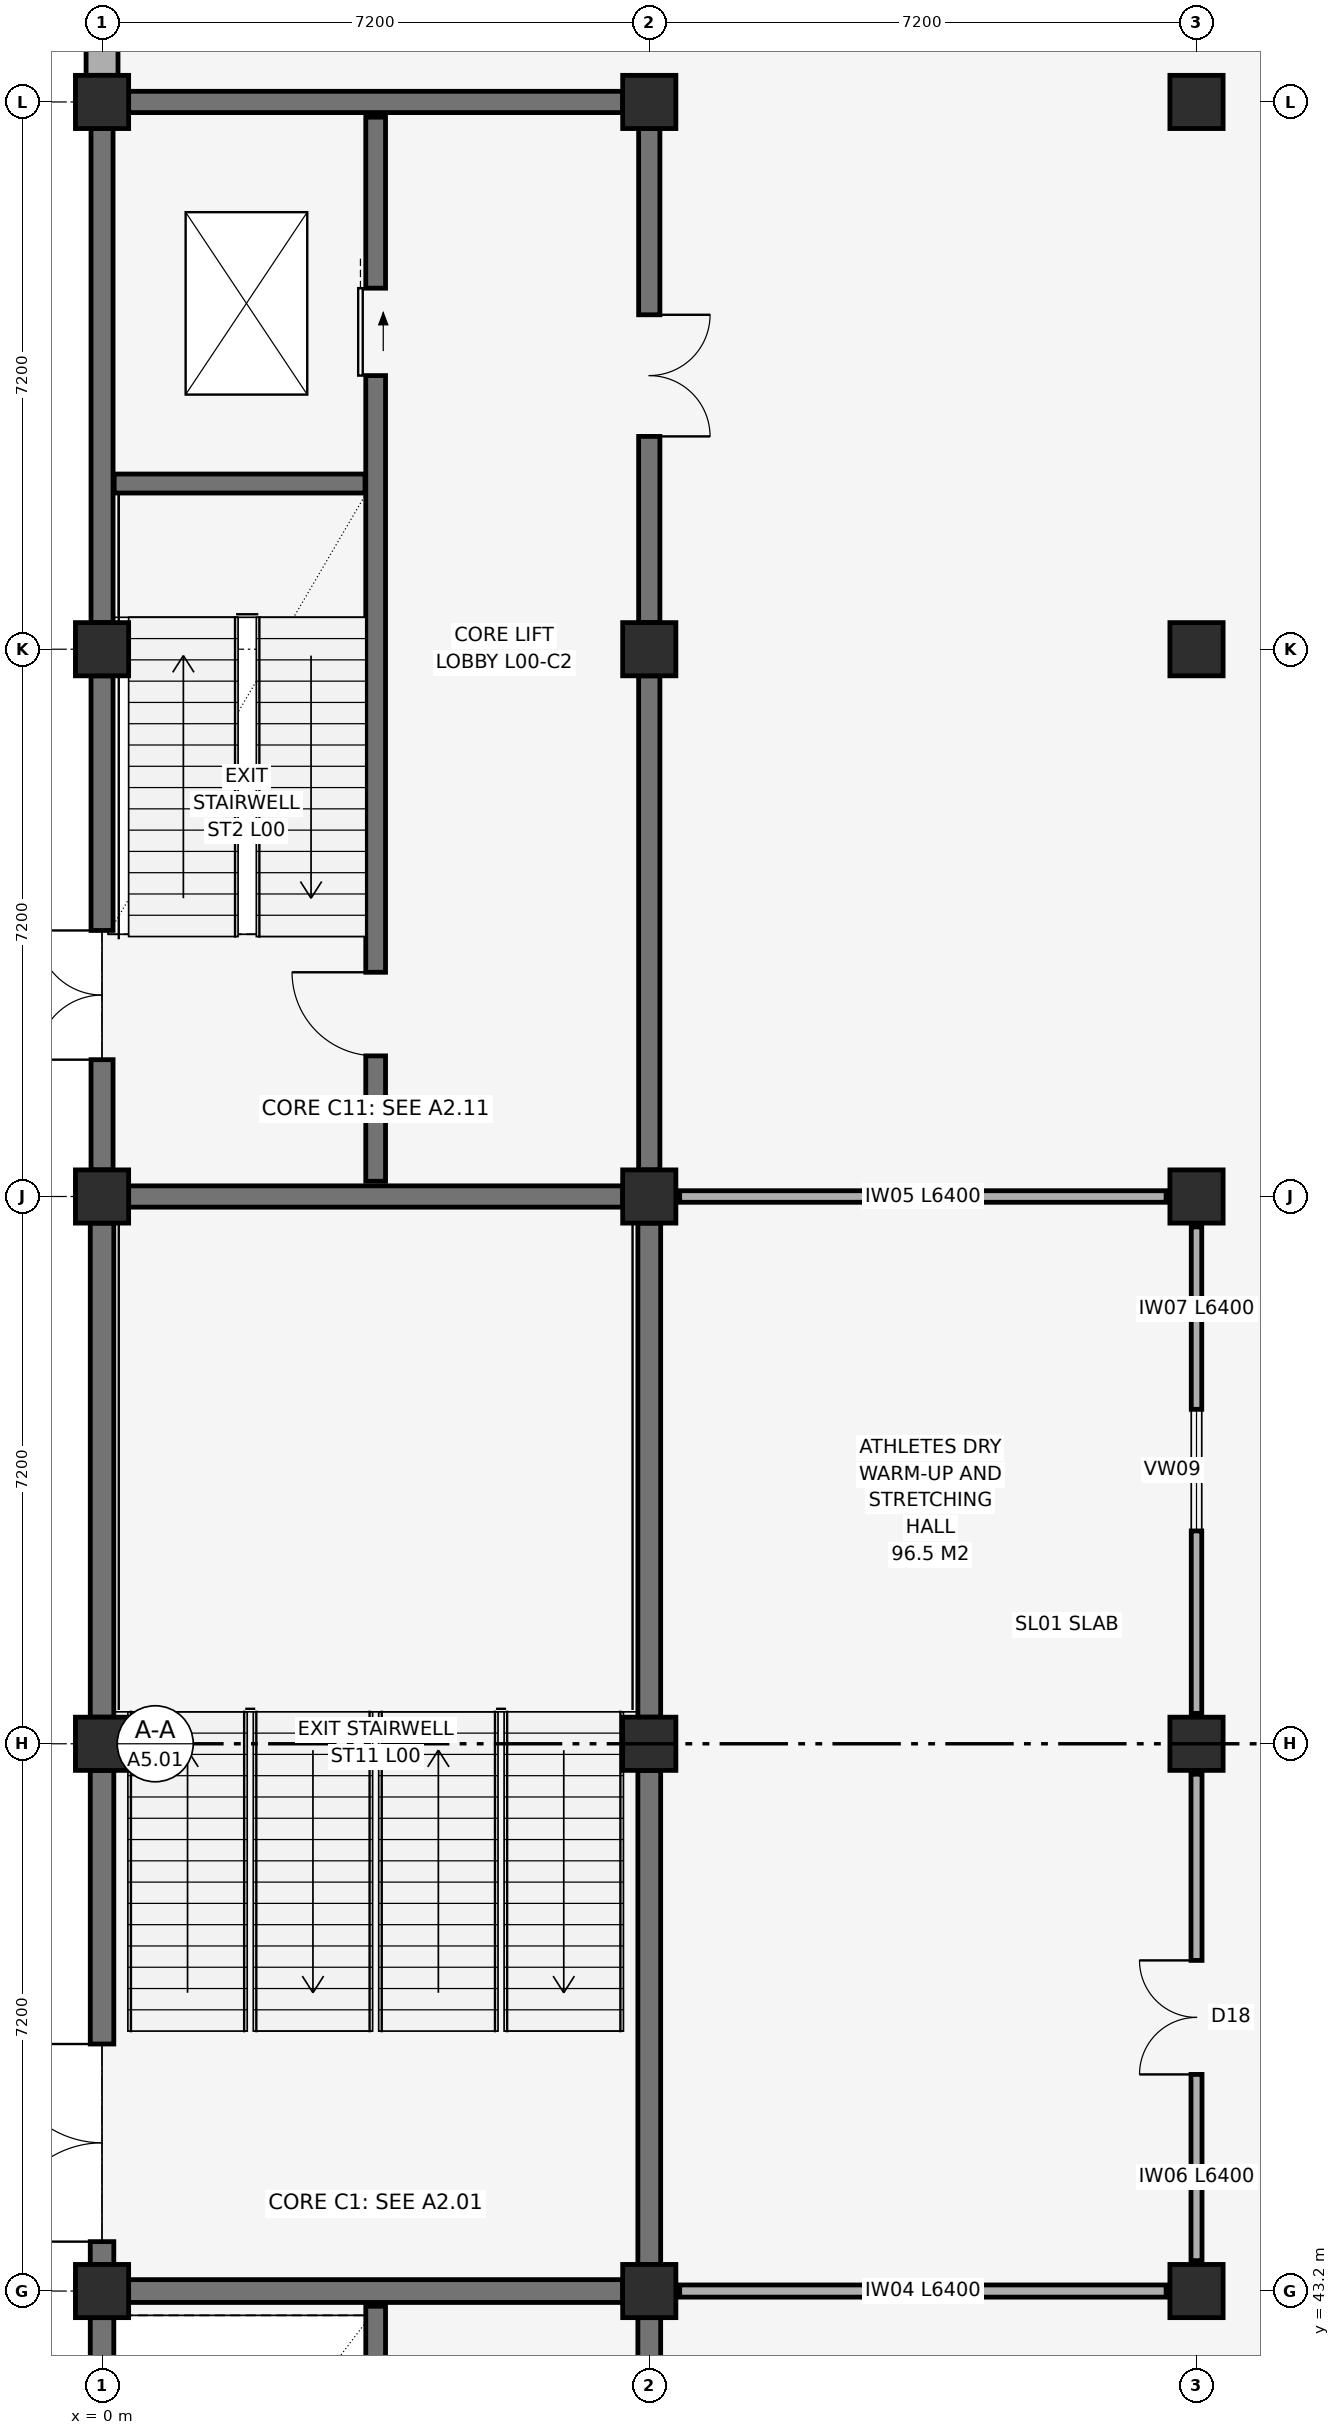
"""IFC4 building model, lengths in metres.
Left out: names, types, materials, properties, quantities, classifications, styles, units other than length and angle.
Written with IfcOpenShell. Run it as: python <this file> out.ifc"""

import sys

from ifc_helpers import new_model, si_unit, direction, frame, frame_2d, origin, origin_2d, place, context, subcontext, project, spatial, rectangle, extrude, element, fill, save


model = new_model("IFC4")
c1 = context("Model", 3, precision=1e-05, world=origin(), true_north=direction((0.0, 1.0)))
c2 = subcontext(c1, "Body", "Model", "MODEL_VIEW")
j1 = project(units=[si_unit("LENGTHUNIT", "METRE"), si_unit("PLANEANGLEUNIT", "RADIAN")], contexts=[c1])
p1 = place(None, origin())
s1 = spatial("IfcSite", under=j1, at=p1, CompositionType="ELEMENT")
p2 = place(p1, origin())
s2 = spatial("IfcBuilding", under=s1, at=p2, CompositionType="ELEMENT")
p3 = place(p2, origin())
s3 = spatial("IfcBuildingStorey", under=s2, at=p3, CompositionType="ELEMENT", Elevation=0.0)
for number, where, z_axis, x_axis in (
    (1, (0.0, 43.2, 0.0), (0.0, 0.0, 1.0), (1.0, 0.0, 0.0)),
    (2, (0.0, 50.4, 0.0), (0.0, 0.0, 1.0), (1.0, 0.0, 0.0)),
    (3, (0.0, 57.6, 0.0), (0.0, 0.0, 1.0), (1.0, 0.0, 0.0)),
    (4, (0.0, 64.8, 0.0), (0.0, 0.0, 1.0), (1.0, 0.0, 0.0)),
    (5, (0.0, 72.0, 0.0), (0.0, 0.0, 1.0), (1.0, 0.0, 0.0)),
    (6, (7.2, 43.2, 0.0), (0.0, 0.0, 1.0), (1.0, 0.0, 0.0)),
    (7, (7.2, 50.4, 0.0), (0.0, 0.0, 1.0), (1.0, 0.0, 0.0)),
    (8, (7.2, 57.6, 0.0), (0.0, 0.0, 1.0), (1.0, 0.0, 0.0)),
    (9, (7.2, 64.8, 0.0), (0.0, 0.0, 1.0), (1.0, 0.0, 0.0)),
    (10, (7.2, 72.0, 0.0), (0.0, 0.0, 1.0), (1.0, 0.0, 0.0)),
    (11, (14.4, 43.2, 0.0), (0.0, 0.0, 1.0), (1.0, 0.0, 0.0)),
    (12, (14.4, 50.4, 0.0), (0.0, 0.0, 1.0), (1.0, 0.0, 0.0)),
    (13, (14.4, 57.6, 0.0), (0.0, 0.0, 1.0), (1.0, 0.0, 0.0)),
    (14, (14.4, 64.8, 0.0), (0.0, 0.0, 1.0), (1.0, 0.0, 0.0)),
    (15, (14.4, 72.0, 0.0), (0.0, 0.0, 1.0), (1.0, 0.0, 0.0)),
):
    element("IfcColumn", number, at=place(p3, frame(where, z_axis=z_axis, x_axis=x_axis)), inside=s3, PredefinedType="COLUMN", context=c2, shape_type="SweptSolid", body=[
        extrude(rectangle(XDim=0.7, YDim=0.7, at=origin_2d()), origin(), (0.0, 0.0, 1.0), 5.4),
    ])
p4 = place(p3, frame((0.0, 72.35, 0.0), z_axis=(0.0, 0.0, 1.0), x_axis=(0.0, 1.0, 0.0)))
e16 = element("IfcWall", 16, at=p4, inside=s3, PredefinedType="SOLIDWALL", context=c2, shape_type="SweptSolid", body=[
    extrude(rectangle(XDim=6.5, YDim=0.42, at=frame_2d((3.25, 0.0))), origin(), (0.0, 0.0, 1.0), 4.29),
])
p5 = place(p4, frame((2.35, 0.0, 0.95)))
e17 = element("IfcOpeningElement", 17, at=p5, cuts=e16, PredefinedType="OPENING", context=c2, shape_type="SweptSolid", body=[
    extrude(rectangle(XDim=1.8, YDim=2.2, at=frame_2d((0.9, 1.1))), frame((0.0, 0.225, 0.0), z_axis=(0.0, -1.0, 0.0), x_axis=(1.0, 0.0, 0.0)), (0.0, 0.0, 1.0), 0.45),
])
p6 = place(p3, frame((0.35, 43.2, 0.0), z_axis=(0.0, 0.0, 1.0), x_axis=(1.0, 0.0, 0.0)))
e18 = element("IfcWall", 18, at=p6, inside=s3, PredefinedType="SHEAR", context=c2, shape_type="SweptSolid", body=[
    extrude(rectangle(XDim=6.5, YDim=0.3, at=frame_2d((3.25, 0.0))), origin(), (0.0, 0.0, 1.0), 5.14),
])
p7 = place(p3, frame((0.0, 36.35, 0.0), z_axis=(0.0, 0.0, 1.0), x_axis=(0.0, 1.0, 0.0)))
e19 = element("IfcWall", 19, at=p7, inside=s3, PredefinedType="SHEAR", context=c2, shape_type="SweptSolid", body=[
    extrude(rectangle(XDim=6.5, YDim=0.31, at=frame_2d((3.25, 0.0))), origin(), (0.0, 0.0, 1.0), 5.14),
])
p8 = place(p3, frame((7.2, 36.35, 0.0), z_axis=(0.0, 0.0, 1.0), x_axis=(0.0, 1.0, 0.0)))
e20 = element("IfcWall", 20, at=p8, inside=s3, PredefinedType="SHEAR", context=c2, shape_type="SweptSolid", body=[
    extrude(rectangle(XDim=6.5, YDim=0.3, at=frame_2d((3.25, 0.0))), origin(), (0.0, 0.0, 1.0), 5.14),
])
p9 = place(p8, frame((2.45, 0.0, 0.0)))
e21 = element("IfcOpeningElement", 21, at=p9, cuts=e20, PredefinedType="OPENING", context=c2, shape_type="SweptSolid", body=[
    extrude(rectangle(XDim=1.6, YDim=2.2, at=frame_2d((0.8, 1.1))), frame((0.0, 0.165, 0.0), z_axis=(0.0, -1.0, 0.0), x_axis=(1.0, 0.0, 0.0)), (0.0, 0.0, 1.0), 0.33),
])
p10 = place(p3, frame((3.6, 29.0, 0.0), z_axis=(0.0, 0.0, 1.0), x_axis=(0.0, 1.0, 0.0)))
e22 = element("IfcWall", 22, at=p10, inside=s3, PredefinedType="SHEAR", context=c2, shape_type="SweptSolid", body=[
    extrude(rectangle(XDim=14.0, YDim=0.26, at=frame_2d((7.0, 0.0))), origin(), (0.0, 0.0, 1.0), 5.14),
])
p11 = place(p10, frame((1.65, 0.0, 0.0)))
e23 = element("IfcOpeningElement", 23, at=p11, cuts=e22, PredefinedType="OPENING", context=c2, shape_type="SweptSolid", body=[
    extrude(rectangle(XDim=1.1, YDim=2.15, at=frame_2d((0.55, 1.075))), frame((0.0, 0.145, 0.0), z_axis=(0.0, -1.0, 0.0), x_axis=(1.0, 0.0, 0.0)), (0.0, 0.0, 1.0), 0.29),
])
p12 = place(p10, frame((10.6, 0.0, 0.0)))
e24 = element("IfcOpeningElement", 24, at=p12, cuts=e22, PredefinedType="OPENING", context=c2, shape_type="SweptSolid", body=[
    extrude(rectangle(XDim=1.1, YDim=2.2, at=frame_2d((0.55, 1.1))), frame((0.0, 0.145, 0.0), z_axis=(0.0, -1.0, 0.0), x_axis=(1.0, 0.0, 0.0)), (0.0, 0.0, 1.0), 0.29),
])
for number, where, z_axis, x_axis in (
    (25, (0.35, 57.6, 0.0), (0.0, 0.0, 1.0), (1.0, 0.0, 0.0)),
    (26, (0.35, 72.0, 0.0), (0.0, 0.0, 1.0), (1.0, 0.0, 0.0)),
):
    element("IfcWall", number, at=place(p3, frame(where, z_axis=z_axis, x_axis=x_axis)), inside=s3, PredefinedType="SHEAR", context=c2, shape_type="SweptSolid", body=[
        extrude(rectangle(XDim=6.5, YDim=0.28, at=frame_2d((3.25, 0.0))), origin(), (0.0, 0.0, 1.0), 5.14),
    ])
p13 = place(p3, frame((0.0, 57.95, 0.0), z_axis=(0.0, 0.0, 1.0), x_axis=(0.0, 1.0, 0.0)))
e27 = element("IfcWall", 27, at=p13, inside=s3, PredefinedType="SHEAR", context=c2, shape_type="SweptSolid", body=[
    extrude(rectangle(XDim=6.5, YDim=0.29, at=frame_2d((3.25, 0.0))), origin(), (0.0, 0.0, 1.0), 5.14),
])
p14 = place(p13, frame((1.45, 0.0, 0.0)))
e28 = element("IfcOpeningElement", 28, at=p14, cuts=e27, PredefinedType="OPENING", context=c2, shape_type="SweptSolid", body=[
    extrude(rectangle(XDim=1.7, YDim=2.3, at=frame_2d((0.85, 1.15))), frame((0.0, 0.16, 0.0), z_axis=(0.0, -1.0, 0.0), x_axis=(1.0, 0.0, 0.0)), (0.0, 0.0, 1.0), 0.32),
])
p15 = place(p3, frame((0.0, 65.15, 0.0), z_axis=(0.0, 0.0, 1.0), x_axis=(0.0, 1.0, 0.0)))
e29 = element("IfcWall", 29, at=p15, inside=s3, PredefinedType="SHEAR", context=c2, shape_type="SweptSolid", body=[
    extrude(rectangle(XDim=6.5, YDim=0.29, at=frame_2d((3.25, 0.0))), origin(), (0.0, 0.0, 1.0), 5.14),
])
p16 = place(p3, frame((7.2, 57.95, 0.0), z_axis=(0.0, 0.0, 1.0), x_axis=(0.0, 1.0, 0.0)))
e30 = element("IfcWall", 30, at=p16, inside=s3, PredefinedType="SHEAR", context=c2, shape_type="SweptSolid", body=[
    extrude(rectangle(XDim=6.5, YDim=0.28, at=frame_2d((3.25, 0.0))), origin(), (0.0, 0.0, 1.0), 5.14),
])
p17 = place(p3, frame((7.2, 65.15, 0.0), z_axis=(0.0, 0.0, 1.0), x_axis=(0.0, 1.0, 0.0)))
e31 = element("IfcWall", 31, at=p17, inside=s3, PredefinedType="SHEAR", context=c2, shape_type="SweptSolid", body=[
    extrude(rectangle(XDim=6.5, YDim=0.28, at=frame_2d((3.25, 0.0))), origin(), (0.0, 0.0, 1.0), 5.14),
])
p18 = place(p17, frame((2.45, 0.0, 0.0)))
e32 = element("IfcOpeningElement", 32, at=p18, cuts=e31, PredefinedType="OPENING", context=c2, shape_type="SweptSolid", body=[
    extrude(rectangle(XDim=1.6, YDim=2.2, at=frame_2d((0.8, 1.1))), frame((0.0, 0.155, 0.0), z_axis=(0.0, -1.0, 0.0), x_axis=(1.0, 0.0, 0.0)), (0.0, 0.0, 1.0), 0.31),
])
p19 = place(p3, frame((3.6, 57.8, 0.0), z_axis=(0.0, 0.0, 1.0), x_axis=(0.0, 1.0, 0.0)))
e33 = element("IfcWall", 33, at=p19, inside=s3, PredefinedType="SHEAR", context=c2, shape_type="SweptSolid", body=[
    extrude(rectangle(XDim=14.0, YDim=0.26, at=frame_2d((7.0, 0.0))), origin(), (0.0, 0.0, 1.0), 5.14),
])
p20 = place(p19, frame((1.65, 0.0, 0.0)))
e34 = element("IfcOpeningElement", 34, at=p20, cuts=e33, PredefinedType="OPENING", context=c2, shape_type="SweptSolid", body=[
    extrude(rectangle(XDim=1.1, YDim=2.15, at=frame_2d((0.55, 1.075))), frame((0.0, 0.145, 0.0), z_axis=(0.0, -1.0, 0.0), x_axis=(1.0, 0.0, 0.0)), (0.0, 0.0, 1.0), 0.29),
])
p21 = place(p19, frame((10.6, 0.0, 0.0)))
e35 = element("IfcOpeningElement", 35, at=p21, cuts=e33, PredefinedType="OPENING", context=c2, shape_type="SweptSolid", body=[
    extrude(rectangle(XDim=1.15, YDim=2.2, at=frame_2d((0.575, 1.1))), frame((0.0, 0.145, 0.0), z_axis=(0.0, -1.0, 0.0), x_axis=(1.0, 0.0, 0.0)), (0.0, 0.0, 1.0), 0.29),
])
p22 = place(p3, frame((0.16, 66.98, 0.0), z_axis=(0.0, 0.0, 1.0), x_axis=(1.0, 0.0, 0.0)))
e36 = element("IfcWall", 36, at=p22, inside=s3, PredefinedType="SHEAR", context=c2, shape_type="SweptSolid", body=[
    extrude(rectangle(XDim=3.3, YDim=0.25, at=frame_2d((1.65, 0.0))), origin(), (0.0, 0.0, 1.0), 5.14),
])
p23 = place(p3, frame((0.0, 43.55, 0.0), z_axis=(0.0, 0.0, 1.0), x_axis=(0.0, 1.0, 0.0)))
e37 = element("IfcWall", 37, at=p23, inside=s3, PredefinedType="SHEAR", context=c2, shape_type="SweptSolid", body=[
    extrude(rectangle(XDim=6.5, YDim=0.31, at=frame_2d((3.25, 0.0))), origin(), (0.0, 0.0, 1.0), 5.14),
])
p24 = place(p23, frame((0.3, 0.0, 0.0)))
e38 = element("IfcOpeningElement", 38, at=p24, cuts=e37, PredefinedType="OPENING", context=c2, shape_type="SweptSolid", body=[
    extrude(rectangle(XDim=2.6, YDim=2.4, at=frame_2d((1.3, 1.2))), frame((0.0, 0.17, 0.0), z_axis=(0.0, -1.0, 0.0), x_axis=(1.0, 0.0, 0.0)), (0.0, 0.0, 1.0), 0.34),
])
p25 = place(p3, frame((0.0, 50.75, 0.0), z_axis=(0.0, 0.0, 1.0), x_axis=(0.0, 1.0, 0.0)))
e39 = element("IfcWall", 39, at=p25, inside=s3, PredefinedType="SHEAR", context=c2, shape_type="SweptSolid", body=[
    extrude(rectangle(XDim=6.5, YDim=0.31, at=frame_2d((3.25, 0.0))), origin(), (0.0, 0.0, 1.0), 5.14),
])
for number, where, z_axis, x_axis in (
    (40, (7.2, 43.55, 0.0), (0.0, 0.0, 1.0), (0.0, 1.0, 0.0)),
    (41, (7.2, 50.75, 0.0), (0.0, 0.0, 1.0), (0.0, 1.0, 0.0)),
):
    element("IfcWall", number, at=place(p3, frame(where, z_axis=z_axis, x_axis=x_axis)), inside=s3, PredefinedType="SHEAR", context=c2, shape_type="SweptSolid", body=[
        extrude(rectangle(XDim=6.5, YDim=0.3, at=frame_2d((3.25, 0.0))), origin(), (0.0, 0.0, 1.0), 5.14),
    ])
p26 = place(p3, frame((7.6, 43.2, 0.0), z_axis=(0.0, 0.0, 1.0), x_axis=(1.0, 0.0, 0.0)))
e42 = element("IfcWall", 42, at=p26, inside=s3, PredefinedType="PARTITIONING", context=c2, shape_type="SweptSolid", body=[
    extrude(rectangle(XDim=6.4, YDim=0.16, at=frame_2d((3.2, 0.0))), origin(), (0.0, 0.0, 1.0), 4.29),
])
p27 = place(p3, frame((7.6, 57.6, 0.0), z_axis=(0.0, 0.0, 1.0), x_axis=(1.0, 0.0, 0.0)))
e43 = element("IfcWall", 43, at=p27, inside=s3, PredefinedType="PARTITIONING", context=c2, shape_type="SweptSolid", body=[
    extrude(rectangle(XDim=6.4, YDim=0.152, at=frame_2d((3.2, 0.0))), origin(), (0.0, 0.0, 1.0), 4.29),
])
p28 = place(p3, frame((14.4, 43.6, 0.0), z_axis=(0.0, 0.0, 1.0), x_axis=(0.0, 1.0, 0.0)))
e44 = element("IfcWall", 44, at=p28, inside=s3, PredefinedType="PARTITIONING", context=c2, shape_type="SweptSolid", body=[
    extrude(rectangle(XDim=6.4, YDim=0.145, at=frame_2d((3.2, 0.0))), origin(), (0.0, 0.0, 1.0), 4.49),
])
p29 = place(p28, frame((2.45, 0.0, 0.0)))
e45 = element("IfcOpeningElement", 45, at=p29, cuts=e44, PredefinedType="OPENING", context=c2, shape_type="SweptSolid", body=[
    extrude(rectangle(XDim=1.5, YDim=2.2, at=frame_2d((0.75, 1.1))), frame((0.0, 0.087, 0.0), z_axis=(0.0, -1.0, 0.0), x_axis=(1.0, 0.0, 0.0)), (0.0, 0.0, 1.0), 0.175),
])
p30 = place(p3, frame((14.4, 50.8, 0.0), z_axis=(0.0, 0.0, 1.0), x_axis=(0.0, 1.0, 0.0)))
e46 = element("IfcWall", 46, at=p30, inside=s3, PredefinedType="PARTITIONING", context=c2, shape_type="SweptSolid", body=[
    extrude(rectangle(XDim=6.4, YDim=0.138, at=frame_2d((3.2, 0.0))), origin(), (0.0, 0.0, 1.0), 4.49),
])
p31 = place(p30, frame((2.4, 0.0, 0.95)))
e47 = element("IfcOpeningElement", 47, at=p31, cuts=e46, PredefinedType="OPENING", context=c2, shape_type="SweptSolid", body=[
    extrude(rectangle(XDim=1.6, YDim=1.35, at=frame_2d((0.8, 0.675))), frame((0.0, 0.084, 0.0), z_axis=(0.0, -1.0, 0.0), x_axis=(1.0, 0.0, 0.0)), (0.0, 0.0, 1.0), 0.168),
])
p32 = place(p20, origin())
e48 = element("IfcDoor", 48, at=p32, inside=s3, OperationType="SINGLE_SWING_RIGHT", PredefinedType="DOOR", context=c2, shape_type="SweptSolid", body=[
    extrude(rectangle(XDim=1.1, YDim=2.15, at=frame_2d((0.55, 1.075))), frame((0.0, 0.025, 0.0), z_axis=(0.0, -1.0, 0.0), x_axis=(1.0, 0.0, 0.0)), (0.0, 0.0, 1.0), 0.05),
])
fill(e34, e48)
p33 = place(p21, frame((1.15, 0.0, 0.0), z_axis=(0.0, 0.0, 1.0), x_axis=(-1.0, 0.0, 0.0)))
e49 = element("IfcDoor", 49, at=p33, inside=s3, OperationType="SLIDING_TO_RIGHT", PredefinedType="DOOR", context=c2, shape_type="SweptSolid", body=[
    extrude(rectangle(XDim=1.15, YDim=2.2, at=frame_2d((0.575, 1.1))), frame((0.0, 0.025, 0.0), z_axis=(0.0, -1.0, 0.0), x_axis=(1.0, 0.0, 0.0)), (0.0, 0.0, 1.0), 0.05),
])
fill(e35, e49)
p34 = place(p18, frame((1.6, 0.0, 0.0), z_axis=(0.0, 0.0, 1.0), x_axis=(-1.0, 0.0, 0.0)))
e50 = element("IfcDoor", 50, at=p34, inside=s3, OperationType="DOUBLE_SWING_LEFT", PredefinedType="DOOR", context=c2, shape_type="SweptSolid", body=[
    extrude(rectangle(XDim=1.6, YDim=2.2, at=frame_2d((0.8, 1.1))), frame((0.0, 0.025, 0.0), z_axis=(0.0, -1.0, 0.0), x_axis=(1.0, 0.0, 0.0)), (0.0, 0.0, 1.0), 0.05),
])
fill(e32, e50)
p35 = place(p14, origin())
e51 = element("IfcDoor", 51, at=p35, inside=s3, OperationType="DOUBLE_SWING_LEFT", PredefinedType="DOOR", context=c2, shape_type="SweptSolid", body=[
    extrude(rectangle(XDim=1.7, YDim=2.3, at=frame_2d((0.85, 1.15))), frame((0.0, 0.025, 0.0), z_axis=(0.0, -1.0, 0.0), x_axis=(1.0, 0.0, 0.0)), (0.0, 0.0, 1.0), 0.05),
])
fill(e28, e51)
p36 = place(p24, origin())
e52 = element("IfcDoor", 52, at=p36, inside=s3, OperationType="DOUBLE_SWING_LEFT", PredefinedType="DOOR", context=c2, shape_type="SweptSolid", body=[
    extrude(rectangle(XDim=2.6, YDim=2.4, at=frame_2d((1.3, 1.2))), frame((0.0, 0.025, 0.0), z_axis=(0.0, -1.0, 0.0), x_axis=(1.0, 0.0, 0.0)), (0.0, 0.0, 1.0), 0.05),
])
fill(e38, e52)
p37 = place(p29, origin())
e53 = element("IfcDoor", 53, at=p37, inside=s3, OperationType="DOUBLE_SWING_LEFT", PredefinedType="DOOR", context=c2, shape_type="SweptSolid", body=[
    extrude(rectangle(XDim=1.5, YDim=2.2, at=frame_2d((0.75, 1.1))), frame((0.0, 0.025, 0.0), z_axis=(0.0, -1.0, 0.0), x_axis=(1.0, 0.0, 0.0)), (0.0, 0.0, 1.0), 0.05),
])
fill(e45, e53)
p38 = place(p31, origin())
e54 = element("IfcWindow", 54, at=p38, inside=s3, PartitioningType="SINGLE_PANEL", PredefinedType="WINDOW", context=c2, shape_type="SweptSolid", body=[
    extrude(rectangle(XDim=1.6, YDim=1.35, at=frame_2d((0.8, 0.675))), frame((0.0, 0.03, 0.0), z_axis=(0.0, -1.0, 0.0), x_axis=(1.0, 0.0, 0.0)), (0.0, 0.0, 1.0), 0.06),
])
fill(e47, e54)
save(model, sys.argv[1])
